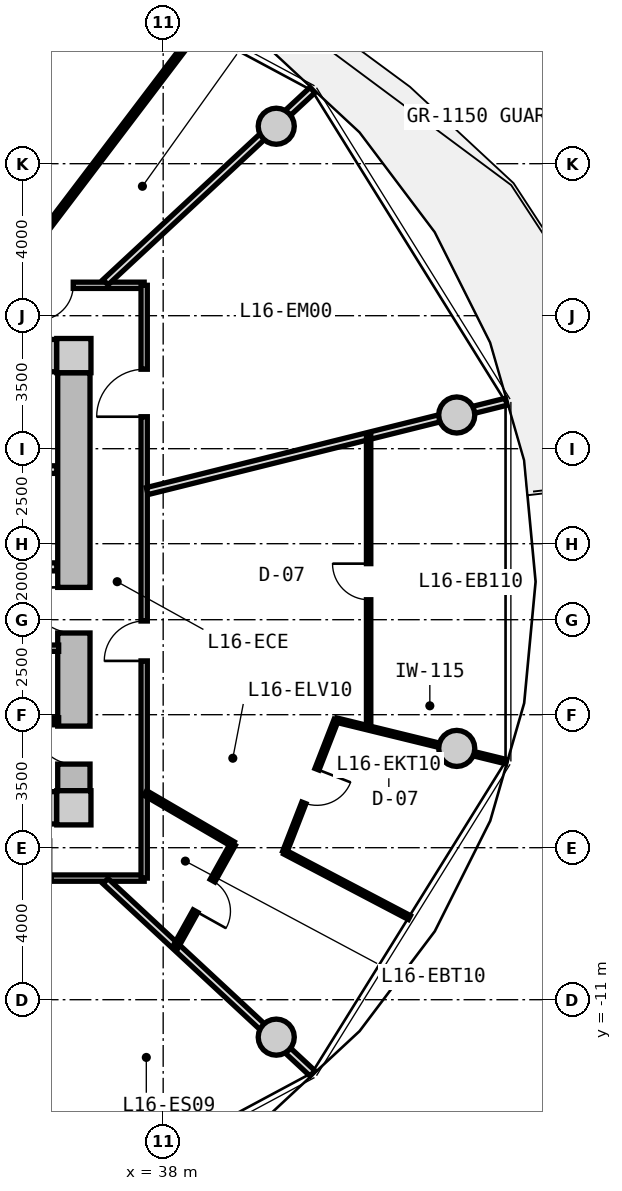
"""IFC4 building model, lengths in metres.
Left out: names, types, materials, properties, quantities, classifications, styles, units other than length and angle.
Written with IfcOpenShell. Run it as: python <this file> out.ifc"""

import sys

from ifc_helpers import new_model, si_unit, direction, frame, frame_2d, origin, origin_2d, place, context, subcontext, project, spatial, rectangle, circle, extrude, source, transform, mapped, element, fill, save


model = new_model("IFC4")
c1 = context("Model", 3, precision=1e-05, world=origin(), true_north=direction((0.0, 1.0)))
c2 = subcontext(c1, "Body", "Model", "MODEL_VIEW")
j1 = project(units=[si_unit("LENGTHUNIT", "METRE"), si_unit("PLANEANGLEUNIT", "RADIAN")], contexts=[c1])
p1 = place(None, origin())
s1 = spatial("IfcSite", under=j1, at=p1, CompositionType="ELEMENT")
p2 = place(p1, origin())
s2 = spatial("IfcBuilding", under=s1, at=p2, CompositionType="ELEMENT")
p3 = place(p2, frame((0.0, 0.0, 55.15)))
s3 = spatial("IfcBuildingStorey", under=s2, at=p3, CompositionType="ELEMENT", Elevation=55.15)
m1 = source(origin(), c2, "Body", "SweptSolid", [
    extrude(rectangle(XDim=0.9, YDim=0.9, at=origin_2d()), origin(), (0.0, 0.0, 1.0), 3.05),
])
for number, where, z_axis, x_axis in (
    (1, (35.65, -5.95, 0.0), (0.0, 0.0, 1.0), (1.0, 0.0, 0.0)),
    (2, (35.65, 5.95, 0.0), (0.0, 0.0, 1.0), (1.0, 0.0, 0.0)),
):
    element("IfcColumn", number, at=place(p3, frame(where, z_axis=z_axis, x_axis=x_axis)), inside=s3, PredefinedType="COLUMN", context=c2, shape_type="MappedRepresentation", body=[
        mapped(m1, transform((0.0, 0.0, 0.0), x_axis=(1.0, 0.0, 0.0), y_axis=(0.0, 1.0, 0.0), z_axis=(0.0, 0.0, 1.0), scale=1.0)),
    ])
m2 = source(origin(), c2, "Body", "SweptSolid", [
    extrude(rectangle(XDim=14.4, YDim=0.85, at=frame_2d((7.2, 0.0))), origin(), (0.0, 0.0, 1.0), 2.79),
])
for number, where, z_axis, x_axis in (
    (3, (20.8, 5.95, 0.0), (0.0, 0.0, 1.0), (1.0, 0.0, 0.0)),
    (4, (35.2, -5.95, 0.0), (0.0, 0.0, 1.0), (-1.0, 0.0, 0.0)),
):
    element("IfcWall", number, at=place(p3, frame(where, z_axis=z_axis, x_axis=x_axis)), inside=s3, PredefinedType="SHEAR", context=c2, shape_type="MappedRepresentation", body=[
        mapped(m2, transform((0.0, 0.0, 0.0), x_axis=(1.0, 0.0, 0.0), y_axis=(0.0, 1.0, 0.0), z_axis=(0.0, 0.0, 1.0), scale=1.0)),
    ])
m3 = source(origin(), c2, "Body", "SweptSolid", [
    extrude(rectangle(XDim=11.0, YDim=0.85, at=frame_2d((5.5, 0.0))), origin(), (0.0, 0.0, 1.0), 2.79),
])
p4 = place(p3, frame((35.65, 5.5, 0.0), z_axis=(0.0, 0.0, 1.0), x_axis=(0.0, -1.0, 0.0)))
e5 = element("IfcWall", 5, at=p4, inside=s3, PredefinedType="SHEAR", context=c2, shape_type="MappedRepresentation", body=[
    mapped(m3, transform((0.0, 0.0, 0.0), x_axis=(1.0, 0.0, 0.0), y_axis=(0.0, 1.0, 0.0), z_axis=(0.0, 0.0, 1.0), scale=1.0)),
])
p5 = place(p4, frame((5.65, 0.0, 0.0)))
e6 = element("IfcOpeningElement", 6, at=p5, cuts=e5, PredefinedType="OPENING", context=c2, shape_type="SweptSolid", body=[
    extrude(rectangle(XDim=1.2, YDim=2.15, at=frame_2d((0.6, 1.075))), frame((0.0, 0.435, 0.0), z_axis=(0.0, -1.0, 0.0), x_axis=(1.0, 0.0, 0.0)), (0.0, 0.0, 1.0), 0.87),
])
p6 = place(p4, frame((9.3, 0.0, 0.0)))
e7 = element("IfcOpeningElement", 7, at=p6, cuts=e5, PredefinedType="OPENING", context=c2, shape_type="SweptSolid", body=[
    extrude(rectangle(XDim=1.0, YDim=2.1, at=frame_2d((0.5, 1.05))), frame((0.0, 0.435, 0.0), z_axis=(0.0, -1.0, 0.0), x_axis=(1.0, 0.0, 0.0)), (0.0, 0.0, 1.0), 0.87),
])
m4 = source(origin(), c2, "Body", "SweptSolid", [
    extrude(circle(Radius=0.475, at=origin_2d()), origin(), (0.0, 0.0, 1.0), 3.05),
])
for number, where, z_axis, x_axis in (
    (8, (45.725, 4.387, 0.0), (0.0, 0.0, 1.0), (1.0, 0.0, 0.0)),
    (9, (40.975, 11.985, 0.0), (0.0, 0.0, 1.0), (1.0, 0.0, 0.0)),
    (10, (40.975, -11.985, 0.0), (0.0, 0.0, 1.0), (1.0, 0.0, 0.0)),
    (11, (45.725, -4.387, 0.0), (0.0, 0.0, 1.0), (1.0, 0.0, 0.0)),
):
    element("IfcColumn", number, at=place(p3, frame(where, z_axis=z_axis, x_axis=x_axis)), inside=s3, PredefinedType="COLUMN", context=c2, shape_type="MappedRepresentation", body=[
        mapped(m4, transform((0.0, 0.0, 0.0), x_axis=(1.0, 0.0, 0.0), y_axis=(0.0, 1.0, 0.0), z_axis=(0.0, 0.0, 1.0), scale=1.0)),
    ])
m5 = source(origin(), c2, "Body", "SweptSolid", [
    extrude(rectangle(XDim=3.2, YDim=0.2, at=frame_2d((1.6, 0.0))), origin(), (0.0, 0.0, 1.0), 2.775),
])
p7 = place(p3, frame((32.0, 2.95, 0.0), z_axis=(0.0, 0.0, 1.0), x_axis=(1.0, 0.0, 0.0)))
e12 = element("IfcWall", 12, at=p7, inside=s3, PredefinedType="PARTITIONING", context=c2, shape_type="MappedRepresentation", body=[
    mapped(m5, transform((0.0, 0.0, 0.0), x_axis=(1.0, 0.0, 0.0), y_axis=(0.0, 1.0, 0.0), z_axis=(0.0, 0.0, 1.0), scale=1.0)),
])
m6 = source(origin(), c2, "Body", "SweptSolid", [
    extrude(rectangle(XDim=6.66, YDim=0.21, at=frame_2d((3.33, 0.0))), origin(), (0.0, 0.0, 1.0), 2.775),
])
p8 = place(p3, frame((28.54, 0.39, 0.0), z_axis=(0.0, 0.0, 1.0), x_axis=(1.0, 0.0, 0.0)))
e13 = element("IfcWall", 13, at=p8, inside=s3, PredefinedType="PARTITIONING", context=c2, shape_type="MappedRepresentation", body=[
    mapped(m6, transform((0.0, 0.0, 0.0), x_axis=(1.0, 0.0, 0.0), y_axis=(0.0, 1.0, 0.0), z_axis=(0.0, 0.0, 1.0), scale=1.0)),
])
p9 = place(p8, frame((1.0, 0.0, 0.0)))
e14 = element("IfcOpeningElement", 14, at=p9, cuts=e13, PredefinedType="OPENING", context=c2, shape_type="SweptSolid", body=[
    extrude(rectangle(XDim=1.2, YDim=2.15, at=frame_2d((0.6, 1.075))), frame((0.0, 0.115, 0.0), z_axis=(0.0, -1.0, 0.0), x_axis=(1.0, 0.0, 0.0)), (0.0, 0.0, 1.0), 0.23),
])
m7 = source(origin(), c2, "Body", "SweptSolid", [
    extrude(rectangle(XDim=2.7, YDim=0.165, at=frame_2d((1.35, 0.0))), origin(), (0.0, 0.0, 1.0), 2.775),
])
p10 = place(p3, frame((32.55, -1.75, 0.0), z_axis=(0.0, 0.0, 1.0), x_axis=(1.0, 0.0, 0.0)))
e15 = element("IfcWall", 15, at=p10, inside=s3, PredefinedType="PARTITIONING", context=c2, shape_type="MappedRepresentation", body=[
    mapped(m7, transform((0.0, 0.0, 0.0), x_axis=(1.0, 0.0, 0.0), y_axis=(0.0, 1.0, 0.0), z_axis=(0.0, 0.0, 1.0), scale=1.0)),
])
p11 = place(p10, frame((0.85, 0.0, 0.0)))
e16 = element("IfcOpeningElement", 16, at=p11, cuts=e15, PredefinedType="OPENING", context=c2, shape_type="SweptSolid", body=[
    extrude(rectangle(XDim=0.925, YDim=2.1, at=frame_2d((0.462, 1.05))), frame((0.0, 0.093, 0.0), z_axis=(0.0, -1.0, 0.0), x_axis=(1.0, 0.0, 0.0)), (0.0, 0.0, 1.0), 0.185),
])
m8 = source(origin(), c2, "Body", "SweptSolid", [
    extrude(rectangle(XDim=2.7, YDim=0.14, at=frame_2d((1.35, 0.0))), origin(), (0.0, 0.0, 1.0), 2.775),
])
p12 = place(p3, frame((32.55, -3.65, 0.0), z_axis=(0.0, 0.0, 1.0), x_axis=(1.0, 0.0, 0.0)))
e17 = element("IfcWall", 17, at=p12, inside=s3, PredefinedType="PARTITIONING", context=c2, shape_type="MappedRepresentation", body=[
    mapped(m8, transform((0.0, 0.0, 0.0), x_axis=(1.0, 0.0, 0.0), y_axis=(0.0, 1.0, 0.0), z_axis=(0.0, 0.0, 1.0), scale=1.0)),
])
m9 = source(origin(), c2, "Body", "SweptSolid", [
    extrude(rectangle(XDim=19.0, YDim=0.165, at=frame_2d((9.5, 0.0))), origin(), (0.0, 0.0, 1.0), 2.775),
])
p13 = place(p3, frame((18.5, 7.8, 0.0), z_axis=(0.0, 0.0, 1.0), x_axis=(1.0, 0.0, 0.0)))
e18 = element("IfcWall", 18, at=p13, inside=s3, PredefinedType="PARTITIONING", context=c2, shape_type="MappedRepresentation", body=[
    mapped(m9, transform((0.0, 0.0, 0.0), x_axis=(1.0, 0.0, 0.0), y_axis=(0.0, 1.0, 0.0), z_axis=(0.0, 0.0, 1.0), scale=1.0)),
])
p14 = place(p13, frame((16.214, 0.0, 0.0)))
e19 = element("IfcOpeningElement", 19, at=p14, cuts=e18, PredefinedType="OPENING", context=c2, shape_type="SweptSolid", body=[
    extrude(rectangle(XDim=0.92, YDim=2.1, at=frame_2d((0.46, 1.05))), frame((0.0, 0.093, 0.0), z_axis=(0.0, -1.0, 0.0), x_axis=(1.0, 0.0, 0.0)), (0.0, 0.0, 1.0), 0.185),
])
p15 = place(p13, frame((13.063, 0.0, 0.0)))
e20 = element("IfcOpeningElement", 20, at=p15, cuts=e18, PredefinedType="OPENING", context=c2, shape_type="SweptSolid", body=[
    extrude(rectangle(XDim=0.92, YDim=2.1, at=frame_2d((0.46, 1.05))), frame((0.0, 0.093, 0.0), z_axis=(0.0, -1.0, 0.0), x_axis=(1.0, 0.0, 0.0)), (0.0, 0.0, 1.0), 0.185),
])
p16 = place(p13, frame((8.875, 0.0, 0.0)))
e21 = element("IfcOpeningElement", 21, at=p16, cuts=e18, PredefinedType="OPENING", context=c2, shape_type="SweptSolid", body=[
    extrude(rectangle(XDim=1.25, YDim=2.2, at=frame_2d((0.625, 1.1))), frame((0.0, 0.093, 0.0), z_axis=(0.0, -1.0, 0.0), x_axis=(1.0, 0.0, 0.0)), (0.0, 0.0, 1.0), 0.185),
])
p17 = place(p13, frame((3.506, 0.0, 0.0)))
e22 = element("IfcOpeningElement", 22, at=p17, cuts=e18, PredefinedType="OPENING", context=c2, shape_type="SweptSolid", body=[
    extrude(rectangle(XDim=1.25, YDim=2.2, at=frame_2d((0.625, 1.1))), frame((0.0, 0.093, 0.0), z_axis=(0.0, -1.0, 0.0), x_axis=(1.0, 0.0, 0.0)), (0.0, 0.0, 1.0), 0.185),
])
p18 = place(p3, frame((37.5, -7.8, 0.0), z_axis=(0.0, 0.0, 1.0), x_axis=(-1.0, 0.0, 0.0)))
e23 = element("IfcWall", 23, at=p18, inside=s3, PredefinedType="PARTITIONING", context=c2, shape_type="MappedRepresentation", body=[
    mapped(m9, transform((0.0, 0.0, 0.0), x_axis=(1.0, 0.0, 0.0), y_axis=(0.0, 1.0, 0.0), z_axis=(0.0, 0.0, 1.0), scale=1.0)),
])
p19 = place(p18, frame((12.706, 0.0, 0.0)))
e24 = element("IfcOpeningElement", 24, at=p19, cuts=e23, PredefinedType="OPENING", context=c2, shape_type="SweptSolid", body=[
    extrude(rectangle(XDim=1.05, YDim=2.15, at=frame_2d((0.525, 1.075))), frame((0.0, 0.093, 0.0), z_axis=(0.0, -1.0, 0.0), x_axis=(1.0, 0.0, 0.0)), (0.0, 0.0, 1.0), 0.185),
])
p20 = place(p18, frame((7.959, 0.0, 0.0)))
e25 = element("IfcOpeningElement", 25, at=p20, cuts=e23, PredefinedType="OPENING", context=c2, shape_type="SweptSolid", body=[
    extrude(rectangle(XDim=1.05, YDim=2.15, at=frame_2d((0.525, 1.075))), frame((0.0, 0.093, 0.0), z_axis=(0.0, -1.0, 0.0), x_axis=(1.0, 0.0, 0.0)), (0.0, 0.0, 1.0), 0.185),
])
p21 = place(p18, frame((2.451, 0.0, 0.0)))
e26 = element("IfcOpeningElement", 26, at=p21, cuts=e23, PredefinedType="OPENING", context=c2, shape_type="SweptSolid", body=[
    extrude(rectangle(XDim=1.05, YDim=2.15, at=frame_2d((0.525, 1.075))), frame((0.0, 0.093, 0.0), z_axis=(0.0, -1.0, 0.0), x_axis=(1.0, 0.0, 0.0)), (0.0, 0.0, 1.0), 0.185),
])
m10 = source(origin(), c2, "Body", "SweptSolid", [
    extrude(rectangle(XDim=15.6, YDim=0.165, at=frame_2d((7.8, 0.0))), origin(), (0.0, 0.0, 1.0), 2.775),
])
p22 = place(p3, frame((37.5, 7.8, 0.0), z_axis=(0.0, 0.0, 1.0), x_axis=(0.0, -1.0, 0.0)))
e27 = element("IfcWall", 27, at=p22, inside=s3, PredefinedType="PARTITIONING", context=c2, shape_type="MappedRepresentation", body=[
    mapped(m10, transform((0.0, 0.0, 0.0), x_axis=(1.0, 0.0, 0.0), y_axis=(0.0, 1.0, 0.0), z_axis=(0.0, 0.0, 1.0), scale=1.0)),
])
p23 = place(p22, frame((8.835, 0.0, 0.0)))
e28 = element("IfcOpeningElement", 28, at=p23, cuts=e27, PredefinedType="OPENING", context=c2, shape_type="SweptSolid", body=[
    extrude(rectangle(XDim=1.05, YDim=2.15, at=frame_2d((0.525, 1.075))), frame((0.0, 0.093, 0.0), z_axis=(0.0, -1.0, 0.0), x_axis=(1.0, 0.0, 0.0)), (0.0, 0.0, 1.0), 0.185),
])
p24 = place(p22, frame((2.208, 0.0, 0.0)))
e29 = element("IfcOpeningElement", 29, at=p24, cuts=e27, PredefinedType="OPENING", context=c2, shape_type="SweptSolid", body=[
    extrude(rectangle(XDim=1.25, YDim=2.2, at=frame_2d((0.625, 1.1))), frame((0.0, 0.093, 0.0), z_axis=(0.0, -1.0, 0.0), x_axis=(1.0, 0.0, 0.0)), (0.0, 0.0, 1.0), 0.185),
])
m11 = source(origin(), c2, "Body", "SweptSolid", [
    extrude(rectangle(XDim=7.435, YDim=0.19, at=frame_2d((3.717, 0.0))), origin(), (0.0, 0.0, 1.0), 2.225),
])
p25 = place(p3, frame((36.483, -7.88, 0.0), z_axis=(0.0, 0.0, 1.0), x_axis=(0.732651956848, -0.680603489652, 0.0)))
e30 = element("IfcWall", 30, at=p25, inside=s3, PredefinedType="PARTITIONING", context=c2, shape_type="MappedRepresentation", body=[
    mapped(m11, transform((0.0, 0.0, 0.0), x_axis=(1.0, 0.0, 0.0), y_axis=(0.0, 1.0, 0.0), z_axis=(0.0, 0.0, 1.0), scale=1.0)),
])
m12 = source(origin(), c2, "Body", "SweptSolid", [
    extrude(rectangle(XDim=9.737, YDim=0.19, at=frame_2d((4.869, 0.0))), origin(), (0.0, 0.0, 1.0), 2.225),
])
p26 = place(p3, frame((37.58, 2.385, 0.0), z_axis=(0.0, 0.0, 1.0), x_axis=(0.970392716238, 0.241532557375, 0.0)))
e31 = element("IfcWall", 31, at=p26, inside=s3, PredefinedType="PARTITIONING", context=c2, shape_type="MappedRepresentation", body=[
    mapped(m12, transform((0.0, 0.0, 0.0), x_axis=(1.0, 0.0, 0.0), y_axis=(0.0, 1.0, 0.0), z_axis=(0.0, 0.0, 1.0), scale=1.0)),
])
m13 = source(origin(), c2, "Body", "SweptSolid", [
    extrude(rectangle(XDim=7.709, YDim=0.115, at=frame_2d((3.855, 0.0))), origin(), (0.0, 0.0, 1.0), 2.775),
])
p27 = place(p3, frame((43.406, -3.855, 0.0), z_axis=(0.0, 0.0, 1.0), x_axis=(0.0, 1.0, 0.0)))
e32 = element("IfcWall", 32, at=p27, inside=s3, PredefinedType="PARTITIONING", context=c2, shape_type="MappedRepresentation", body=[
    mapped(m13, transform((0.0, 0.0, 0.0), x_axis=(1.0, 0.0, 0.0), y_axis=(0.0, 1.0, 0.0), z_axis=(0.0, 0.0, 1.0), scale=1.0)),
])
p28 = place(p27, frame((3.38, 0.0, 0.0)))
e33 = element("IfcOpeningElement", 33, at=p28, cuts=e32, PredefinedType="OPENING", context=c2, shape_type="SweptSolid", body=[
    extrude(rectangle(XDim=0.95, YDim=2.1, at=frame_2d((0.475, 1.05))), frame((0.0, 0.067, 0.0), z_axis=(0.0, -1.0, 0.0), x_axis=(1.0, 0.0, 0.0)), (0.0, 0.0, 1.0), 0.135),
])
m14 = source(origin(), c2, "Body", "SweptSolid", [
    extrude(rectangle(XDim=4.608, YDim=0.115, at=frame_2d((2.304, 0.0))), origin(), (0.0, 0.0, 1.0), 2.225),
])
p29 = place(p3, frame((42.553, -3.641, 0.0), z_axis=(0.0, 0.0, 1.0), x_axis=(0.97135200068, -0.237645304552, 0.0)))
e34 = element("IfcWall", 34, at=p29, inside=s3, PredefinedType="PARTITIONING", context=c2, shape_type="MappedRepresentation", body=[
    mapped(m14, transform((0.0, 0.0, 0.0), x_axis=(1.0, 0.0, 0.0), y_axis=(0.0, 1.0, 0.0), z_axis=(0.0, 0.0, 1.0), scale=1.0)),
])
m15 = source(origin(), c2, "Body", "SweptSolid", [
    extrude(rectangle(XDim=2.669, YDim=0.14, at=frame_2d((1.335, 0.0))), origin(), (0.0, 0.0, 1.0), 2.775),
])
p30 = place(p3, frame((37.53, -5.561, 0.0), z_axis=(0.0, 0.0, 1.0), x_axis=(0.86369928178, -0.50400749067, 0.0)))
e35 = element("IfcWall", 35, at=p30, inside=s3, PredefinedType="PARTITIONING", context=c2, shape_type="MappedRepresentation", body=[
    mapped(m15, transform((0.0, 0.0, 0.0), x_axis=(1.0, 0.0, 0.0), y_axis=(0.0, 1.0, 0.0), z_axis=(0.0, 0.0, 1.0), scale=1.0)),
])
m16 = source(origin(), c2, "Body", "SweptSolid", [
    extrude(rectangle(XDim=3.121, YDim=0.14, at=frame_2d((1.561, 0.0))), origin(), (0.0, 0.0, 1.0), 2.775),
])
p31 = place(p3, frame((39.836, -6.906, 0.0), z_axis=(0.0, 0.0, 1.0), x_axis=(-0.487302357327, -0.873233309342, 0.0)))
e36 = element("IfcWall", 36, at=p31, inside=s3, PredefinedType="PARTITIONING", context=c2, shape_type="MappedRepresentation", body=[
    mapped(m16, transform((0.0, 0.0, 0.0), x_axis=(1.0, 0.0, 0.0), y_axis=(0.0, 1.0, 0.0), z_axis=(0.0, 0.0, 1.0), scale=1.0)),
])
p32 = place(p31, frame((1.101, 0.0, 0.0)))
e37 = element("IfcOpeningElement", 37, at=p32, cuts=e36, PredefinedType="OPENING", context=c2, shape_type="SweptSolid", body=[
    extrude(rectangle(XDim=0.92, YDim=2.1, at=frame_2d((0.46, 1.05))), frame((0.0, 0.08, 0.0), z_axis=(0.0, -1.0, 0.0), x_axis=(1.0, 0.0, 0.0)), (0.0, 0.0, 1.0), 0.16),
])
m17 = source(origin(), c2, "Body", "SweptSolid", [
    extrude(rectangle(XDim=3.706, YDim=0.115, at=frame_2d((1.853, 0.0))), origin(), (0.0, 0.0, 1.0), 2.775),
])
p33 = place(p3, frame((41.198, -7.115, 0.0), z_axis=(0.0, 0.0, 1.0), x_axis=(0.88538502503, -0.464858427322, 0.0)))
e38 = element("IfcWall", 38, at=p33, inside=s3, PredefinedType="PARTITIONING", context=c2, shape_type="MappedRepresentation", body=[
    mapped(m17, transform((0.0, 0.0, 0.0), x_axis=(1.0, 0.0, 0.0), y_axis=(0.0, 1.0, 0.0), z_axis=(0.0, 0.0, 1.0), scale=1.0)),
])
m18 = source(origin(), c2, "Body", "SweptSolid", [
    extrude(rectangle(XDim=3.729, YDim=0.115, at=frame_2d((1.864, 0.0))), origin(), (0.0, 0.0, 1.0), 2.775),
])
p34 = place(p3, frame((41.198, -7.115, 0.0), z_axis=(0.0, 0.0, 1.0), x_axis=(0.363055991464, 0.93176732453, 0.0)))
e39 = element("IfcWall", 39, at=p34, inside=s3, PredefinedType="PARTITIONING", context=c2, shape_type="MappedRepresentation", body=[
    mapped(m18, transform((0.0, 0.0, 0.0), x_axis=(1.0, 0.0, 0.0), y_axis=(0.0, 1.0, 0.0), z_axis=(0.0, 0.0, 1.0), scale=1.0)),
])
p35 = place(p34, frame((1.389, 0.0, 0.0)))
e40 = element("IfcOpeningElement", 40, at=p35, cuts=e39, PredefinedType="OPENING", context=c2, shape_type="SweptSolid", body=[
    extrude(rectangle(XDim=0.95, YDim=2.1, at=frame_2d((0.475, 1.05))), frame((0.0, 0.067, 0.0), z_axis=(0.0, -1.0, 0.0), x_axis=(1.0, 0.0, 0.0)), (0.0, 0.0, 1.0), 0.135),
])
p36 = place(p3, frame((36.483, 7.88, 0.0), z_axis=(0.0, 0.0, 1.0), x_axis=(0.732651956848, 0.680603489652, 0.0)))
e41 = element("IfcWall", 41, at=p36, inside=s3, PredefinedType="PARTITIONING", context=c2, shape_type="MappedRepresentation", body=[
    mapped(m11, transform((0.0, 0.0, 0.0), x_axis=(1.0, 0.0, 0.0), y_axis=(0.0, 1.0, 0.0), z_axis=(0.0, 0.0, 1.0), scale=1.0)),
])
m19 = source(origin(), c2, "Body", "SweptSolid", [
    extrude(rectangle(XDim=8.436, YDim=0.14, at=frame_2d((4.218, 0.0))), origin(), (0.0, 0.0, 1.0), 2.775),
])
p37 = place(p3, frame((33.828, 7.83, 0.0), z_axis=(0.0, 0.0, 1.0), x_axis=(0.604486552388, 0.796615345058, 0.0)))
e42 = element("IfcWall", 42, at=p37, inside=s3, PredefinedType="PARTITIONING", context=c2, shape_type="MappedRepresentation", body=[
    mapped(m19, transform((0.0, 0.0, 0.0), x_axis=(1.0, 0.0, 0.0), y_axis=(0.0, 1.0, 0.0), z_axis=(0.0, 0.0, 1.0), scale=1.0)),
])
m20 = source(origin(), c2, "Body", "SweptSolid", [
    extrude(rectangle(XDim=1.2, YDim=2.15, at=frame_2d((0.6, 1.075))), frame((0.0, 0.025, 0.0), z_axis=(0.0, -1.0, 0.0), x_axis=(1.0, 0.0, 0.0)), (0.0, 0.0, 1.0), 0.05),
])
p38 = place(p5, frame((1.2, 0.0, 0.0), z_axis=(0.0, 0.0, 1.0), x_axis=(-1.0, 0.0, 0.0)))
e43 = element("IfcDoor", 43, at=p38, inside=s3, OperationType="SINGLE_SWING_RIGHT", PredefinedType="DOOR", context=c2, shape_type="MappedRepresentation", body=[
    mapped(m20, transform((0.0, 0.0, 0.0), x_axis=(1.0, 0.0, 0.0), y_axis=(0.0, 1.0, 0.0), z_axis=(0.0, 0.0, 1.0), scale=1.0)),
])
fill(e6, e43)
m21 = source(origin(), c2, "Body", "SweptSolid", [
    extrude(rectangle(XDim=1.0, YDim=2.1, at=frame_2d((0.5, 1.05))), frame((0.0, 0.025, 0.0), z_axis=(0.0, -1.0, 0.0), x_axis=(1.0, 0.0, 0.0)), (0.0, 0.0, 1.0), 0.05),
])
p39 = place(p6, frame((1.0, 0.0, 0.0), z_axis=(0.0, 0.0, 1.0), x_axis=(-1.0, 0.0, 0.0)))
e44 = element("IfcDoor", 44, at=p39, inside=s3, OperationType="SINGLE_SWING_RIGHT", PredefinedType="DOOR", context=c2, shape_type="MappedRepresentation", body=[
    mapped(m21, transform((0.0, 0.0, 0.0), x_axis=(1.0, 0.0, 0.0), y_axis=(0.0, 1.0, 0.0), z_axis=(0.0, 0.0, 1.0), scale=1.0)),
])
fill(e7, e44)
m22 = source(origin(), c2, "Body", "SweptSolid", [
    extrude(rectangle(XDim=1.05, YDim=2.15, at=frame_2d((0.525, 1.075))), frame((0.0, 0.025, 0.0), z_axis=(0.0, -1.0, 0.0), x_axis=(1.0, 0.0, 0.0)), (0.0, 0.0, 1.0), 0.05),
])
p40 = place(p23, frame((1.05, 0.0, 0.0), z_axis=(0.0, 0.0, 1.0), x_axis=(-1.0, 0.0, 0.0)))
e45 = element("IfcDoor", 45, at=p40, inside=s3, OperationType="SINGLE_SWING_LEFT", PredefinedType="DOOR", context=c2, shape_type="MappedRepresentation", body=[
    mapped(m22, transform((0.0, 0.0, 0.0), x_axis=(1.0, 0.0, 0.0), y_axis=(0.0, 1.0, 0.0), z_axis=(0.0, 0.0, 1.0), scale=1.0)),
])
fill(e28, e45)
m23 = source(origin(), c2, "Body", "SweptSolid", [
    extrude(rectangle(XDim=0.92, YDim=2.1, at=frame_2d((0.46, 1.05))), frame((0.0, 0.025, 0.0), z_axis=(0.0, -1.0, 0.0), x_axis=(1.0, 0.0, 0.0)), (0.0, 0.0, 1.0), 0.05),
])
p41 = place(p32, origin())
e46 = element("IfcDoor", 46, at=p41, inside=s3, OperationType="SINGLE_SWING_RIGHT", PredefinedType="DOOR", context=c2, shape_type="MappedRepresentation", body=[
    mapped(m23, transform((0.0, 0.0, 0.0), x_axis=(1.0, 0.0, 0.0), y_axis=(0.0, 1.0, 0.0), z_axis=(0.0, 0.0, 1.0), scale=1.0)),
])
fill(e37, e46)
m24 = source(origin(), c2, "Body", "SweptSolid", [
    extrude(rectangle(XDim=0.95, YDim=2.1, at=frame_2d((0.475, 1.05))), frame((0.0, 0.025, 0.0), z_axis=(0.0, -1.0, 0.0), x_axis=(1.0, 0.0, 0.0)), (0.0, 0.0, 1.0), 0.05),
])
p42 = place(p35, frame((0.95, 0.0, 0.0), z_axis=(0.0, 0.0, 1.0), x_axis=(-1.0, 0.0, 0.0)))
e47 = element("IfcDoor", 47, at=p42, inside=s3, OperationType="SINGLE_SWING_LEFT", PredefinedType="DOOR", context=c2, shape_type="MappedRepresentation", body=[
    mapped(m24, transform((0.0, 0.0, 0.0), x_axis=(1.0, 0.0, 0.0), y_axis=(0.0, 1.0, 0.0), z_axis=(0.0, 0.0, 1.0), scale=1.0)),
])
fill(e40, e47)
p43 = place(p28, origin())
e48 = element("IfcDoor", 48, at=p43, inside=s3, OperationType="SINGLE_SWING_RIGHT", PredefinedType="DOOR", context=c2, shape_type="MappedRepresentation", body=[
    mapped(m24, transform((0.0, 0.0, 0.0), x_axis=(1.0, 0.0, 0.0), y_axis=(0.0, 1.0, 0.0), z_axis=(0.0, 0.0, 1.0), scale=1.0)),
])
fill(e33, e48)
m25 = source(origin(), c2, "Body", "SweptSolid", [
    extrude(rectangle(XDim=1.25, YDim=2.2, at=frame_2d((0.625, 1.1))), frame((0.0, 0.025, 0.0), z_axis=(0.0, -1.0, 0.0), x_axis=(1.0, 0.0, 0.0)), (0.0, 0.0, 1.0), 0.05),
])
p44 = place(p24, frame((1.25, 0.0, 0.0), z_axis=(0.0, 0.0, 1.0), x_axis=(-1.0, 0.0, 0.0)))
e49 = element("IfcDoor", 49, at=p44, inside=s3, OperationType="SINGLE_SWING_LEFT", PredefinedType="DOOR", context=c2, shape_type="MappedRepresentation", body=[
    mapped(m25, transform((0.0, 0.0, 0.0), x_axis=(1.0, 0.0, 0.0), y_axis=(0.0, 1.0, 0.0), z_axis=(0.0, 0.0, 1.0), scale=1.0)),
])
fill(e29, e49)
p45 = place(p14, frame((0.92, 0.0, 0.0), z_axis=(0.0, 0.0, 1.0), x_axis=(-1.0, 0.0, 0.0)))
e50 = element("IfcDoor", 50, at=p45, inside=s3, OperationType="SINGLE_SWING_RIGHT", PredefinedType="DOOR", context=c2, shape_type="MappedRepresentation", body=[
    mapped(m23, transform((0.0, 0.0, 0.0), x_axis=(1.0, 0.0, 0.0), y_axis=(0.0, 1.0, 0.0), z_axis=(0.0, 0.0, 1.0), scale=1.0)),
])
fill(e19, e50)
save(model, sys.argv[1])
